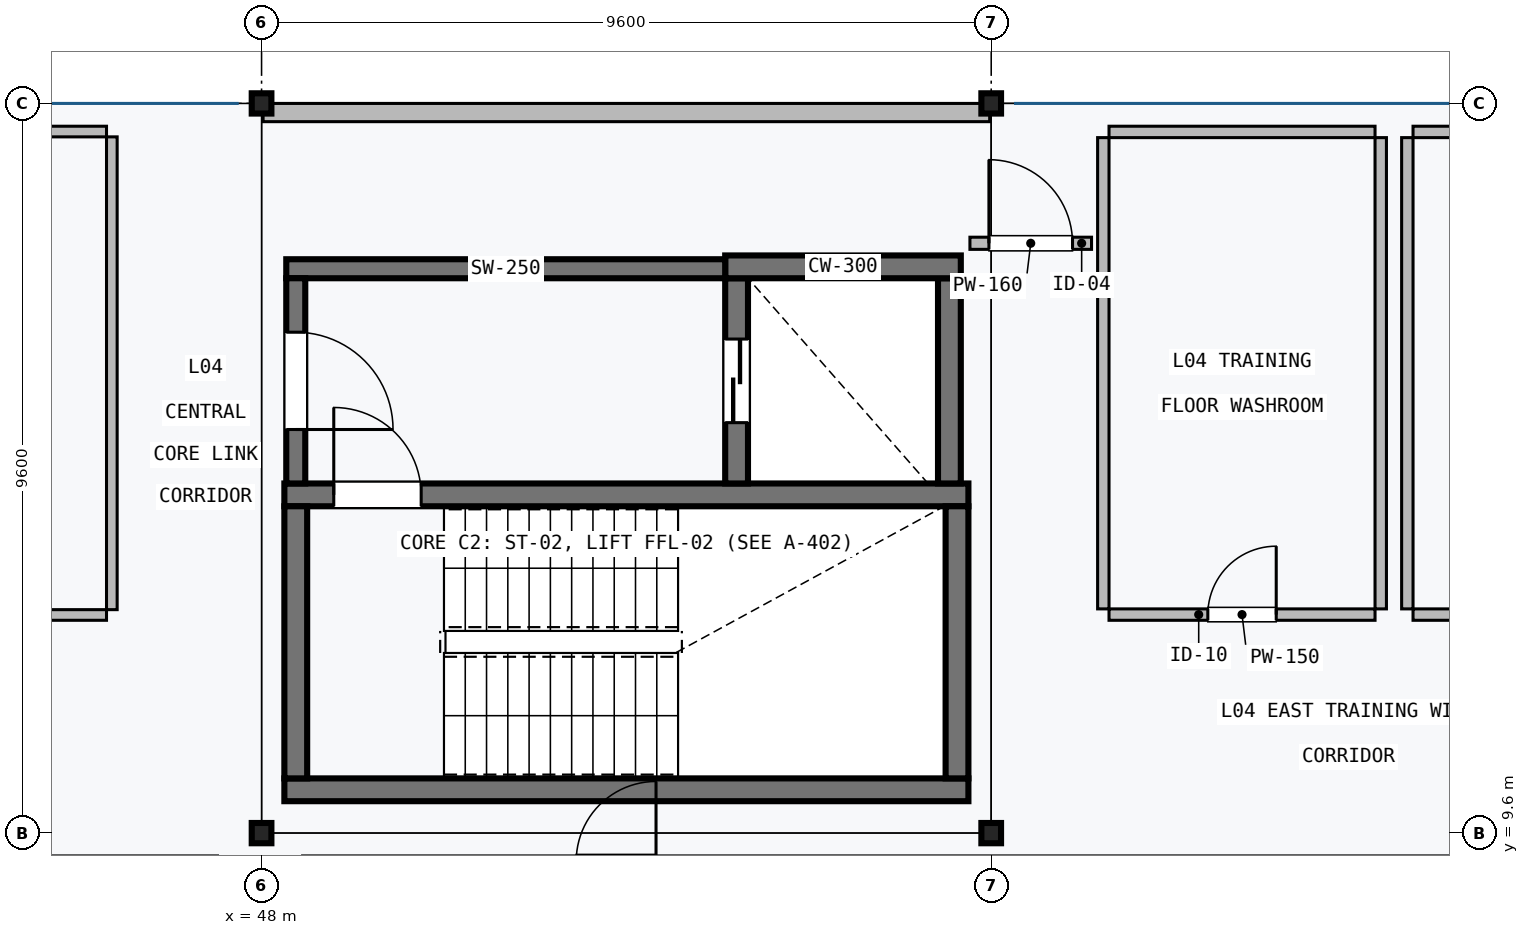
"""IFC4 building model, lengths in metres.
Left out: names, types, materials, properties, quantities, classifications, styles, units other than length and angle.
Written with IfcOpenShell. Run it as: python <this file> out.ifc"""

import sys

from ifc_helpers import new_model, si_unit, direction, frame, frame_2d, origin, origin_2d, place, context, subcontext, project, spatial, rectangle, i_section, extrude, element, fill, save


model = new_model("IFC4")
c1 = context("Model", 3, precision=1e-05, world=origin(), true_north=direction((0.0, 1.0)))
c2 = subcontext(c1, "Body", "Model", "MODEL_VIEW")
j1 = project(units=[si_unit("LENGTHUNIT", "METRE"), si_unit("PLANEANGLEUNIT", "RADIAN")], contexts=[c1])
p1 = place(None, origin())
s1 = spatial("IfcSite", under=j1, at=p1, CompositionType="ELEMENT")
p2 = place(p1, origin())
s2 = spatial("IfcBuilding", under=s1, at=p2, CompositionType="ELEMENT")
p3 = place(p2, frame((0.0, 0.0, 18.9)))
s3 = spatial("IfcBuildingStorey", under=s2, at=p3, CompositionType="ELEMENT", Elevation=18.9)
for number, where, z_axis, x_axis in (
    (1, (48.0, 9.6, 0.0), (0.0, 0.0, 1.0), (1.0, 0.0, 0.0)),
    (2, (48.0, 19.2, 0.0), (0.0, 0.0, 1.0), (1.0, 0.0, 0.0)),
    (3, (57.6, 9.6, 0.0), (0.0, 0.0, 1.0), (1.0, 0.0, 0.0)),
    (4, (57.6, 19.2, 0.0), (0.0, 0.0, 1.0), (1.0, 0.0, 0.0)),
):
    element("IfcColumn", number, at=place(p3, frame(where, z_axis=z_axis, x_axis=x_axis)), inside=s3, PredefinedType="COLUMN", context=c2, shape_type="SweptSolid", body=[
        extrude(i_section(OverallWidth=0.259, OverallDepth=0.267, WebThickness=0.013, FlangeThickness=0.021, FilletRadius=0.013, at=origin_2d()), origin(), (0.0, 0.0, 1.0), 3.95),
    ])
p4 = place(p3, frame((48.3, 10.17, 0.0), z_axis=(0.0, 0.0, 1.0), x_axis=(1.0, 0.0, 0.0)))
e5 = element("IfcWall", 5, at=p4, inside=s3, PredefinedType="SHEAR", context=c2, shape_type="SweptSolid", body=[
    extrude(rectangle(XDim=9.0, YDim=0.3, at=frame_2d((4.5, 0.0))), origin(), (0.0, 0.0, 1.0), 3.95),
])
p5 = place(p3, frame((57.3, 14.05, 0.0), z_axis=(0.0, 0.0, 1.0), x_axis=(-1.0, 0.0, 0.0)))
e6 = element("IfcWall", 6, at=p5, inside=s3, PredefinedType="SHEAR", context=c2, shape_type="SweptSolid", body=[
    extrude(rectangle(XDim=9.0, YDim=0.3, at=frame_2d((4.5, 0.0))), origin(), (0.0, 0.0, 1.0), 3.95),
])
p6 = place(p5, frame((7.2, 0.0, 0.0)))
e7 = element("IfcOpeningElement", 7, at=p6, cuts=e6, PredefinedType="OPENING", context=c2, shape_type="SweptSolid", body=[
    extrude(rectangle(XDim=1.15, YDim=2.15, at=frame_2d((0.575, 1.075))), frame((0.0, 0.16, 0.0), z_axis=(0.0, -1.0, 0.0), x_axis=(1.0, 0.0, 0.0)), (0.0, 0.0, 1.0), 0.32),
])
for number, where, z_axis, x_axis in (
    (8, (48.45, 10.32, 0.0), (0.0, 0.0, 1.0), (0.0, 1.0, 0.0)),
    (9, (57.15, 13.9, 0.0), (0.0, 0.0, 1.0), (0.0, -1.0, 0.0)),
):
    element("IfcWall", number, at=place(p3, frame(where, z_axis=z_axis, x_axis=x_axis)), inside=s3, PredefinedType="SHEAR", context=c2, shape_type="SweptSolid", body=[
        extrude(rectangle(XDim=3.58, YDim=0.3, at=frame_2d((1.79, 0.0))), origin(), (0.0, 0.0, 1.0), 3.95),
    ])
p7 = place(p3, frame((54.25, 16.9, 0.0), z_axis=(0.0, 0.0, 1.0), x_axis=(0.0, -1.0, 0.0)))
e10 = element("IfcWall", 10, at=p7, inside=s3, PredefinedType="SHEAR", context=c2, shape_type="SweptSolid", body=[
    extrude(rectangle(XDim=2.7, YDim=0.3, at=frame_2d((1.35, 0.0))), origin(), (0.0, 0.0, 1.0), 3.95),
])
p8 = place(p7, frame((0.8, 0.0, 0.0)))
e11 = element("IfcOpeningElement", 11, at=p8, cuts=e10, PredefinedType="OPENING", context=c2, shape_type="SweptSolid", body=[
    extrude(rectangle(XDim=1.1, YDim=2.1, at=frame_2d((0.55, 1.05))), frame((0.0, 0.16, 0.0), z_axis=(0.0, -1.0, 0.0), x_axis=(1.0, 0.0, 0.0)), (0.0, 0.0, 1.0), 0.32),
])
p9 = place(p3, frame((57.05, 14.2, 0.0), z_axis=(0.0, 0.0, 1.0), x_axis=(0.0, 1.0, 0.0)))
e12 = element("IfcWall", 12, at=p9, inside=s3, PredefinedType="SHEAR", context=c2, shape_type="SweptSolid", body=[
    extrude(rectangle(XDim=2.7, YDim=0.3, at=frame_2d((1.35, 0.0))), origin(), (0.0, 0.0, 1.0), 3.95),
])
p10 = place(p3, frame((54.1, 17.05, 0.0), z_axis=(0.0, 0.0, 1.0), x_axis=(1.0, 0.0, 0.0)))
e13 = element("IfcWall", 13, at=p10, inside=s3, PredefinedType="SHEAR", context=c2, shape_type="SweptSolid", body=[
    extrude(rectangle(XDim=3.1, YDim=0.3, at=frame_2d((1.55, 0.0))), origin(), (0.0, 0.0, 1.0), 3.95),
])
p11 = place(p3, frame((54.1, 17.025, 0.0), z_axis=(0.0, 0.0, 1.0), x_axis=(-1.0, 0.0, 0.0)))
e14 = element("IfcWall", 14, at=p11, inside=s3, PredefinedType="SHEAR", context=c2, shape_type="SweptSolid", body=[
    extrude(rectangle(XDim=5.775, YDim=0.25, at=frame_2d((2.888, 0.0))), origin(), (0.0, 0.0, 1.0), 3.95),
])
p12 = place(p3, frame((48.45, 14.2, 0.0), z_axis=(0.0, 0.0, 1.0), x_axis=(0.0, 1.0, 0.0)))
e15 = element("IfcWall", 15, at=p12, inside=s3, PredefinedType="SHEAR", context=c2, shape_type="SweptSolid", body=[
    extrude(rectangle(XDim=2.7, YDim=0.25, at=frame_2d((1.35, 0.0))), origin(), (0.0, 0.0, 1.0), 3.95),
])
p13 = place(p12, frame((0.71, 0.0, 0.0)))
e16 = element("IfcOpeningElement", 16, at=p13, cuts=e15, PredefinedType="OPENING", context=c2, shape_type="SweptSolid", body=[
    extrude(rectangle(XDim=1.28, YDim=2.2, at=frame_2d((0.64, 1.1))), frame((0.0, 0.135, 0.0), z_axis=(0.0, -1.0, 0.0), x_axis=(1.0, 0.0, 0.0)), (0.0, 0.0, 1.0), 0.27),
])
p14 = place(p3, frame((48.02, 19.08, 0.0), z_axis=(0.0, 0.0, 1.0), x_axis=(1.0, 0.0, 0.0)))
e17 = element("IfcWall", 17, at=p14, inside=s3, PredefinedType="SOLIDWALL", context=c2, shape_type="SweptSolid", body=[
    extrude(rectangle(XDim=9.56, YDim=0.24, at=frame_2d((4.78, 0.0))), origin(), (0.0, 0.0, 1.0), 3.66),
])
p15 = place(p3, frame((57.32, 17.36, 0.0), z_axis=(0.0, 0.0, 1.0), x_axis=(1.0, 0.0, 0.0)))
e18 = element("IfcWall", 18, at=p15, inside=s3, PredefinedType="PARTITIONING", context=c2, shape_type="SweptSolid", body=[
    extrude(rectangle(XDim=1.6, YDim=0.16, at=frame_2d((0.8, 0.0))), origin(), (0.0, 0.0, 1.0), 3.483),
])
p16 = place(p15, frame((0.25, 0.0, 0.0)))
e19 = element("IfcOpeningElement", 19, at=p16, cuts=e18, PredefinedType="OPENING", context=c2, shape_type="SweptSolid", body=[
    extrude(rectangle(XDim=1.1, YDim=2.2, at=frame_2d((0.55, 1.1))), frame((0.0, 0.09, 0.0), z_axis=(0.0, -1.0, 0.0), x_axis=(1.0, 0.0, 0.0)), (0.0, 0.0, 1.0), 0.18),
])
p17 = place(p3, frame((45.96, 12.47, 0.0), z_axis=(0.0, 0.0, 1.0), x_axis=(-1.0, 0.0, 0.0)))
e20 = element("IfcWall", 20, at=p17, inside=s3, PredefinedType="PARTITIONING", context=c2, shape_type="SweptSolid", body=[
    extrude(rectangle(XDim=16.62, YDim=0.14, at=frame_2d((8.31, 0.0))), origin(), (0.0, 0.0, 1.0), 3.483),
])
p18 = place(p17, frame((3.6, 0.0, 0.0)))
e21 = element("IfcOpeningElement", 21, at=p18, cuts=e20, PredefinedType="OPENING", context=c2, shape_type="SweptSolid", body=[
    extrude(rectangle(XDim=1.05, YDim=2.2, at=frame_2d((0.525, 1.1))), frame((0.0, 0.08, 0.0), z_axis=(0.0, -1.0, 0.0), x_axis=(1.0, 0.0, 0.0)), (0.0, 0.0, 1.0), 0.16),
])
p19 = place(p3, frame((29.34, 18.83, 0.0), z_axis=(0.0, 0.0, 1.0), x_axis=(1.0, 0.0, 0.0)))
e22 = element("IfcWall", 22, at=p19, inside=s3, PredefinedType="PARTITIONING", context=c2, shape_type="SweptSolid", body=[
    extrude(rectangle(XDim=16.62, YDim=0.14, at=frame_2d((8.31, 0.0))), origin(), (0.0, 0.0, 1.0), 3.483),
])
p20 = place(p3, frame((46.03, 18.76, 0.0), z_axis=(0.0, 0.0, 1.0), x_axis=(0.0, -1.0, 0.0)))
e23 = element("IfcWall", 23, at=p20, inside=s3, PredefinedType="PARTITIONING", context=c2, shape_type="SweptSolid", body=[
    extrude(rectangle(XDim=6.22, YDim=0.14, at=frame_2d((3.11, 0.0))), origin(), (0.0, 0.0, 1.0), 3.59),
])
p21 = place(p3, frame((62.65, 12.475, 0.0), z_axis=(0.0, 0.0, 1.0), x_axis=(-1.0, 0.0, 0.0)))
e24 = element("IfcWall", 24, at=p21, inside=s3, PredefinedType="PLUMBINGWALL", context=c2, shape_type="SweptSolid", body=[
    extrude(rectangle(XDim=3.5, YDim=0.15, at=frame_2d((1.75, 0.0))), origin(), (0.0, 0.0, 1.0), 3.59),
])
p22 = place(p21, frame((1.3, 0.0, 0.0)))
e25 = element("IfcOpeningElement", 25, at=p22, cuts=e24, PredefinedType="OPENING", context=c2, shape_type="SweptSolid", body=[
    extrude(rectangle(XDim=0.9, YDim=2.1, at=frame_2d((0.45, 1.05))), frame((0.0, 0.085, 0.0), z_axis=(0.0, -1.0, 0.0), x_axis=(1.0, 0.0, 0.0)), (0.0, 0.0, 1.0), 0.17),
])
p23 = place(p3, frame((59.15, 18.825, 0.0), z_axis=(0.0, 0.0, 1.0), x_axis=(1.0, 0.0, 0.0)))
e26 = element("IfcWall", 26, at=p23, inside=s3, PredefinedType="PLUMBINGWALL", context=c2, shape_type="SweptSolid", body=[
    extrude(rectangle(XDim=3.5, YDim=0.15, at=frame_2d((1.75, 0.0))), origin(), (0.0, 0.0, 1.0), 3.59),
])
for number, where, z_axis, x_axis in (
    (27, (59.075, 12.55, 0.0), (0.0, 0.0, 1.0), (0.0, 1.0, 0.0)),
    (28, (62.725, 18.75, 0.0), (0.0, 0.0, 1.0), (0.0, -1.0, 0.0)),
):
    element("IfcWall", number, at=place(p3, frame(where, z_axis=z_axis, x_axis=x_axis)), inside=s3, PredefinedType="PLUMBINGWALL", context=c2, shape_type="SweptSolid", body=[
        extrude(rectangle(XDim=6.2, YDim=0.15, at=frame_2d((3.1, 0.0))), origin(), (0.0, 0.0, 1.0), 3.59),
    ])
p24 = place(p3, frame((66.65, 12.475, 0.0), z_axis=(0.0, 0.0, 1.0), x_axis=(-1.0, 0.0, 0.0)))
e29 = element("IfcWall", 29, at=p24, inside=s3, PredefinedType="PLUMBINGWALL", context=c2, shape_type="SweptSolid", body=[
    extrude(rectangle(XDim=3.5, YDim=0.15, at=frame_2d((1.75, 0.0))), origin(), (0.0, 0.0, 1.0), 3.59),
])
p25 = place(p24, frame((1.25, 0.0, 0.0)))
e30 = element("IfcOpeningElement", 30, at=p25, cuts=e29, PredefinedType="OPENING", context=c2, shape_type="SweptSolid", body=[
    extrude(rectangle(XDim=1.0, YDim=2.15, at=frame_2d((0.5, 1.075))), frame((0.0, 0.085, 0.0), z_axis=(0.0, -1.0, 0.0), x_axis=(1.0, 0.0, 0.0)), (0.0, 0.0, 1.0), 0.17),
])
p26 = place(p3, frame((63.15, 18.825, 0.0), z_axis=(0.0, 0.0, 1.0), x_axis=(1.0, 0.0, 0.0)))
e31 = element("IfcWall", 31, at=p26, inside=s3, PredefinedType="PLUMBINGWALL", context=c2, shape_type="SweptSolid", body=[
    extrude(rectangle(XDim=3.5, YDim=0.15, at=frame_2d((1.75, 0.0))), origin(), (0.0, 0.0, 1.0), 3.59),
])
p27 = place(p3, frame((63.075, 12.55, 0.0), z_axis=(0.0, 0.0, 1.0), x_axis=(0.0, 1.0, 0.0)))
e32 = element("IfcWall", 32, at=p27, inside=s3, PredefinedType="PLUMBINGWALL", context=c2, shape_type="SweptSolid", body=[
    extrude(rectangle(XDim=6.2, YDim=0.15, at=frame_2d((3.1, 0.0))), origin(), (0.0, 0.0, 1.0), 3.59),
])
p28 = place(p6, frame((1.15, 0.0, 0.0), z_axis=(0.0, 0.0, 1.0), x_axis=(-1.0, 0.0, 0.0)))
e33 = element("IfcDoor", 33, at=p28, inside=s3, OperationType="SINGLE_SWING_RIGHT", PredefinedType="DOOR", context=c2, shape_type="SweptSolid", body=[
    extrude(rectangle(XDim=1.15, YDim=2.15, at=frame_2d((0.575, 1.075))), frame((0.0, 0.025, 0.0), z_axis=(0.0, -1.0, 0.0), x_axis=(1.0, 0.0, 0.0)), (0.0, 0.0, 1.0), 0.05),
])
fill(e7, e33)
p29 = place(p8, frame((1.1, 0.0, 0.0), z_axis=(0.0, 0.0, 1.0), x_axis=(-1.0, 0.0, 0.0)))
e34 = element("IfcDoor", 34, at=p29, inside=s3, OperationType="DOUBLE_DOOR_SLIDING", PredefinedType="DOOR", context=c2, shape_type="SweptSolid", body=[
    extrude(rectangle(XDim=1.1, YDim=2.1, at=frame_2d((0.55, 1.05))), frame((0.0, 0.025, 0.0), z_axis=(0.0, -1.0, 0.0), x_axis=(1.0, 0.0, 0.0)), (0.0, 0.0, 1.0), 0.05),
])
fill(e11, e34)
p30 = place(p13, frame((1.28, 0.0, 0.0), z_axis=(0.0, 0.0, 1.0), x_axis=(-1.0, 0.0, 0.0)))
e35 = element("IfcDoor", 35, at=p30, inside=s3, OperationType="SINGLE_SWING_LEFT", PredefinedType="DOOR", context=c2, shape_type="SweptSolid", body=[
    extrude(rectangle(XDim=1.28, YDim=2.2, at=frame_2d((0.64, 1.1))), frame((0.0, 0.025, 0.0), z_axis=(0.0, -1.0, 0.0), x_axis=(1.0, 0.0, 0.0)), (0.0, 0.0, 1.0), 0.05),
])
fill(e16, e35)
p31 = place(p16, origin())
e36 = element("IfcDoor", 36, at=p31, inside=s3, OperationType="SINGLE_SWING_LEFT", PredefinedType="DOOR", context=c2, shape_type="SweptSolid", body=[
    extrude(rectangle(XDim=1.1, YDim=2.2, at=frame_2d((0.55, 1.1))), frame((0.0, 0.025, 0.0), z_axis=(0.0, -1.0, 0.0), x_axis=(1.0, 0.0, 0.0)), (0.0, 0.0, 1.0), 0.05),
])
fill(e19, e36)
p32 = place(p22, frame((0.9, 0.0, 0.0), z_axis=(0.0, 0.0, 1.0), x_axis=(-1.0, 0.0, 0.0)))
e37 = element("IfcDoor", 37, at=p32, inside=s3, OperationType="SINGLE_SWING_LEFT", PredefinedType="DOOR", context=c2, shape_type="SweptSolid", body=[
    extrude(rectangle(XDim=0.9, YDim=2.1, at=frame_2d((0.45, 1.05))), frame((0.0, 0.025, 0.0), z_axis=(0.0, -1.0, 0.0), x_axis=(1.0, 0.0, 0.0)), (0.0, 0.0, 1.0), 0.05),
])
fill(e25, e37)
save(model, sys.argv[1])
